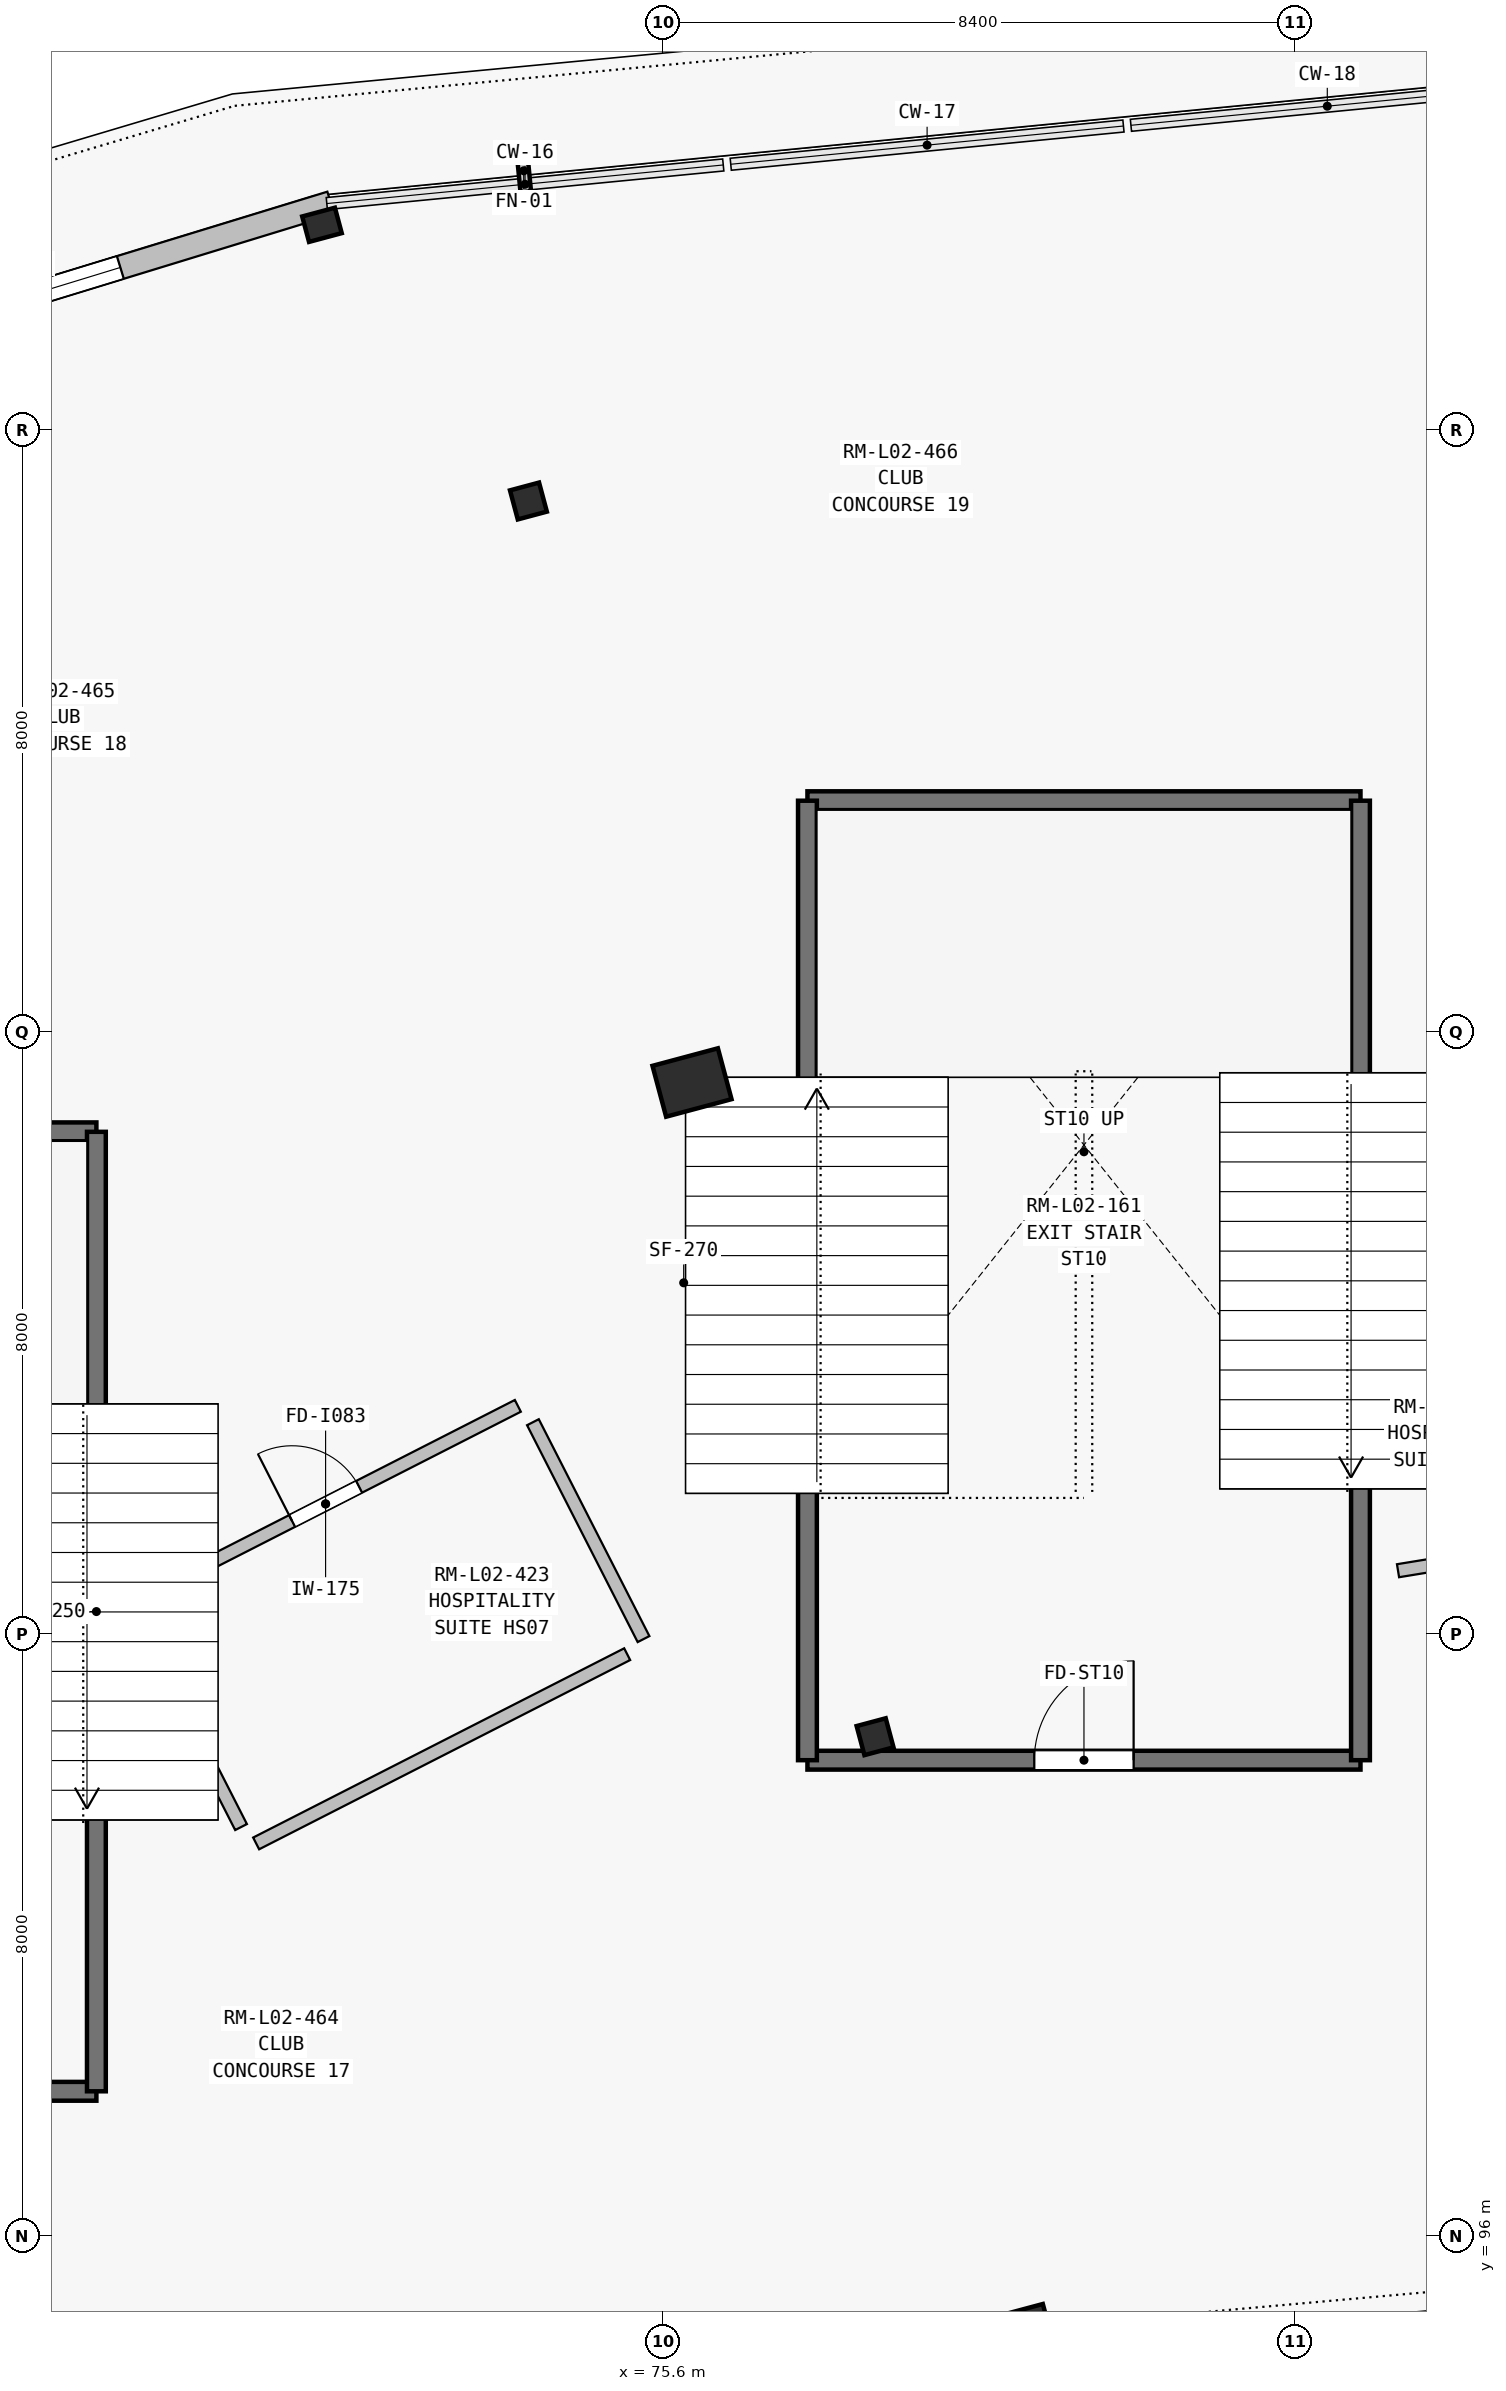
"""IFC4 building model, lengths in metres.
Left out: names, types, materials, properties, quantities, classifications, styles, units other than length and angle.
Written with IfcOpenShell. Run it as: python <this file> out.ifc"""

import sys

from ifc_helpers import new_model, si_unit, direction, frame, frame_2d, origin, origin_2d, place, context, subcontext, project, spatial, rectangle, i_section, extrude, element, fill, save


model = new_model("IFC4")
c1 = context("Model", 3, precision=1e-05, world=origin(), true_north=direction((0.0, 1.0)))
c2 = subcontext(c1, "Body", "Model", "MODEL_VIEW")
j1 = project(units=[si_unit("LENGTHUNIT", "METRE"), si_unit("PLANEANGLEUNIT", "RADIAN")], contexts=[c1])
p1 = place(None, origin())
s1 = spatial("IfcSite", under=j1, at=p1, CompositionType="ELEMENT")
p2 = place(p1, origin())
s2 = spatial("IfcBuilding", under=s1, at=p2, CompositionType="ELEMENT")
p3 = place(p2, frame((0.0, 0.0, 9.9)))
s3 = spatial("IfcBuildingStorey", under=s2, at=p3, CompositionType="ELEMENT", Elevation=9.9)
p4 = place(p3, frame((78.424, 102.637, 0.0), z_axis=(0.0, 0.0, 1.0), x_axis=(-0.258819045103, 0.965925826289, 0.0)))
e1 = element("IfcColumn", 1, at=p4, inside=s3, PredefinedType="COLUMN", context=c2, shape_type="SweptSolid", body=[
    extrude(i_section(OverallWidth=0.4, OverallDepth=0.4, WebThickness=0.018, FlangeThickness=0.032, at=origin_2d()), origin(), (0.0, 0.0, 1.0), 4.5),
])
p5 = place(p3, frame((80.388, 94.639, 0.0), z_axis=(0.0, 0.0, 1.0), x_axis=(-0.258819045103, 0.965925826289, 0.0)))
e2 = element("IfcColumn", 2, at=p5, inside=s3, PredefinedType="COLUMN", context=c2, shape_type="SweptSolid", body=[
    extrude(rectangle(XDim=0.75, YDim=0.75, at=origin_2d()), origin(), (0.0, 0.0, 1.0), 3.553),
])
p6 = place(p3, frame((75.991, 111.33, 0.0), z_axis=(0.0, 0.0, 1.0), x_axis=(-0.258819045103, 0.965925826289, 0.0)))
e3 = element("IfcColumn", 3, at=p6, inside=s3, PredefinedType="COLUMN", context=c2, shape_type="SweptSolid", body=[
    extrude(rectangle(XDim=0.7, YDim=0.9, at=origin_2d()), origin(), (0.0, 0.0, 1.0), 4.5),
])
p7 = place(p3, frame((73.817, 119.058, 0.0), z_axis=(0.0, 0.0, 1.0), x_axis=(-0.258819045103, 0.965925826289, 0.0)))
e4 = element("IfcColumn", 4, at=p7, inside=s3, PredefinedType="COLUMN", context=c2, shape_type="SweptSolid", body=[
    extrude(i_section(OverallWidth=0.4, OverallDepth=0.4, WebThickness=0.016, FlangeThickness=0.028, at=origin_2d()), origin(), (0.0, 0.0, 1.0), 4.5),
])
p8 = place(p3, frame((71.073, 122.728, 0.0), z_axis=(0.0, 0.0, 1.0), x_axis=(-0.258819045103, 0.965925826289, 0.0)))
e5 = element("IfcColumn", 5, at=p8, inside=s3, PredefinedType="PILASTER", context=c2, shape_type="SweptSolid", body=[
    extrude(rectangle(XDim=0.35, YDim=0.45, at=origin_2d()), origin(), (0.0, 0.0, 1.0), 5.45),
])
p9 = place(p3, frame((50.871, 116.797, 0.0), z_axis=(0.0, 0.0, 1.0), x_axis=(0.956190176803, 0.292746213956, 0.0)))
e6 = element("IfcWall", 6, at=p9, inside=s3, PredefinedType="SOLIDWALL", context=c2, shape_type="SweptSolid", body=[
    extrude(rectangle(XDim=21.25, YDim=0.315, at=frame_2d((10.625, 0.0))), origin(), (0.0, 0.0, 1.0), 4.265),
])
p10 = place(p9, frame((11.025, 0.0, 0.9)))
e7 = element("IfcOpeningElement", 7, at=p10, cuts=e6, PredefinedType="OPENING", context=c2, shape_type="SweptSolid", body=[
    extrude(rectangle(XDim=2.85, YDim=1.6, at=frame_2d((1.425, 0.8))), frame((0.0, 0.167, 0.0), z_axis=(0.0, -1.0, 0.0), x_axis=(1.0, 0.0, 0.0)), (0.0, 0.0, 1.0), 0.335),
])
p11 = place(p9, frame((15.775, 0.0, 0.9)))
e8 = element("IfcOpeningElement", 8, at=p11, cuts=e6, PredefinedType="OPENING", context=c2, shape_type="SweptSolid", body=[
    extrude(rectangle(XDim=2.55, YDim=1.55, at=frame_2d((1.275, 0.775))), frame((0.0, 0.167, 0.0), z_axis=(0.0, -1.0, 0.0), x_axis=(1.0, 0.0, 0.0)), (0.0, 0.0, 1.0), 0.335),
])
p12 = place(p3, frame((60.725, 97.925, 0.0), z_axis=(0.0, 0.0, 1.0), x_axis=(1.0, 0.0, 0.0)))
e9 = element("IfcWall", 9, at=p12, inside=s3, PredefinedType="SHEAR", context=c2, shape_type="SweptSolid", body=[
    extrude(rectangle(XDim=7.35, YDim=0.25, at=frame_2d((3.675, 0.0))), origin(), (0.0, 0.0, 1.0), 4.5),
])
p13 = place(p12, frame((2.975, 0.0, 0.0)))
e10 = element("IfcOpeningElement", 10, at=p13, cuts=e9, PredefinedType="OPENING", context=c2, shape_type="SweptSolid", body=[
    extrude(rectangle(XDim=1.4, YDim=2.2, at=frame_2d((0.7, 1.1))), frame((0.0, 0.135, 0.0), z_axis=(0.0, -1.0, 0.0), x_axis=(1.0, 0.0, 0.0)), (0.0, 0.0, 1.0), 0.27),
])
p14 = place(p3, frame((60.725, 110.675, 0.0), z_axis=(0.0, 0.0, 1.0), x_axis=(1.0, 0.0, 0.0)))
e11 = element("IfcWall", 11, at=p14, inside=s3, PredefinedType="SHEAR", context=c2, shape_type="SweptSolid", body=[
    extrude(rectangle(XDim=7.35, YDim=0.25, at=frame_2d((3.675, 0.0))), origin(), (0.0, 0.0, 1.0), 4.5),
])
p15 = place(p3, frame((68.075, 97.925, 0.0), z_axis=(0.0, 0.0, 1.0), x_axis=(0.0, 1.0, 0.0)))
e12 = element("IfcWall", 12, at=p15, inside=s3, PredefinedType="SHEAR", context=c2, shape_type="SweptSolid", body=[
    extrude(rectangle(XDim=12.75, YDim=0.25, at=frame_2d((6.375, 0.0))), origin(), (0.0, 0.0, 1.0), 4.5),
])
p16 = place(p3, frame((77.525, 102.325, 0.0), z_axis=(0.0, 0.0, 1.0), x_axis=(1.0, 0.0, 0.0)))
e13 = element("IfcWall", 13, at=p16, inside=s3, PredefinedType="SHEAR", context=c2, shape_type="SweptSolid", body=[
    extrude(rectangle(XDim=7.35, YDim=0.25, at=frame_2d((3.675, 0.0))), origin(), (0.0, 0.0, 1.0), 4.5),
])
p17 = place(p16, frame((3.015, 0.0, 0.0)))
e14 = element("IfcOpeningElement", 14, at=p17, cuts=e13, PredefinedType="OPENING", context=c2, shape_type="SweptSolid", body=[
    extrude(rectangle(XDim=1.32, YDim=2.2, at=frame_2d((0.66, 1.1))), frame((0.0, 0.135, 0.0), z_axis=(0.0, -1.0, 0.0), x_axis=(1.0, 0.0, 0.0)), (0.0, 0.0, 1.0), 0.27),
])
p18 = place(p3, frame((77.525, 115.075, 0.0), z_axis=(0.0, 0.0, 1.0), x_axis=(1.0, 0.0, 0.0)))
e15 = element("IfcWall", 15, at=p18, inside=s3, PredefinedType="SHEAR", context=c2, shape_type="SweptSolid", body=[
    extrude(rectangle(XDim=7.35, YDim=0.25, at=frame_2d((3.675, 0.0))), origin(), (0.0, 0.0, 1.0), 4.5),
])
for number, where, z_axis, x_axis in (
    (16, (77.525, 102.325, 0.0), (0.0, 0.0, 1.0), (0.0, 1.0, 0.0)),
    (17, (84.875, 102.325, 0.0), (0.0, 0.0, 1.0), (0.0, 1.0, 0.0)),
):
    element("IfcWall", number, at=place(p3, frame(where, z_axis=z_axis, x_axis=x_axis)), inside=s3, PredefinedType="SHEAR", context=c2, shape_type="SweptSolid", body=[
        extrude(rectangle(XDim=12.75, YDim=0.25, at=frame_2d((6.375, 0.0))), origin(), (0.0, 0.0, 1.0), 4.5),
    ])
p19 = place(p3, frame((88.353, 105.329, 0.0), z_axis=(0.0, 0.0, 1.0), x_axis=(-0.98693078035, -0.16114476348, 0.0)))
e18 = element("IfcWall", 18, at=p19, inside=s3, PredefinedType="PARTITIONING", context=c2, shape_type="SweptSolid", body=[
    extrude(rectangle(XDim=3.018, YDim=0.175, at=frame_2d((1.509, 0.0))), origin(), (0.0, 0.0, 1.0), 4.19),
])
p20 = place(p3, frame((85.374, 108.49, 0.0), z_axis=(0.0, 0.0, 1.0), x_axis=(0.986934184777, 0.161123911693, 0.0)))
e19 = element("IfcWall", 19, at=p20, inside=s3, PredefinedType="PARTITIONING", context=c2, shape_type="SweptSolid", body=[
    extrude(rectangle(XDim=2.43, YDim=0.175, at=frame_2d((1.215, 0.0))), origin(), (0.0, 0.0, 1.0), 4.19),
])
p21 = place(p3, frame((68.566, 104.428, 0.0), z_axis=(0.0, 0.0, 1.0), x_axis=(0.890831838742, 0.454333176297, 0.0)))
e20 = element("IfcWall", 20, at=p21, inside=s3, PredefinedType="PARTITIONING", context=c2, shape_type="SweptSolid", body=[
    extrude(rectangle(XDim=5.736, YDim=0.175, at=frame_2d((2.868, 0.0))), origin(), (0.0, 0.0, 1.0), 4.19),
])
p22 = place(p21, frame((2.368, 0.0, 0.0)))
e21 = element("IfcOpeningElement", 21, at=p22, cuts=e20, PredefinedType="OPENING", context=c2, shape_type="SweptSolid", body=[
    extrude(rectangle(XDim=1.0, YDim=2.2, at=frame_2d((0.5, 1.1))), frame((0.0, 0.097, 0.0), z_axis=(0.0, -1.0, 0.0), x_axis=(1.0, 0.0, 0.0)), (0.0, 0.0, 1.0), 0.195),
])
p23 = place(p3, frame((73.877, 106.816, 0.0), z_axis=(0.0, 0.0, 1.0), x_axis=(0.454353030946, -0.890821712393, 0.0)))
e22 = element("IfcWall", 22, at=p23, inside=s3, PredefinedType="PARTITIONING", context=c2, shape_type="SweptSolid", body=[
    extrude(rectangle(XDim=3.235, YDim=0.175, at=frame_2d((1.618, 0.0))), origin(), (0.0, 0.0, 1.0), 4.19),
])
p24 = place(p3, frame((75.129, 103.734, 0.0), z_axis=(0.0, 0.0, 1.0), x_axis=(-0.890825995052, -0.454344634105, 0.0)))
e23 = element("IfcWall", 23, at=p24, inside=s3, PredefinedType="PARTITIONING", context=c2, shape_type="SweptSolid", body=[
    extrude(rectangle(XDim=5.535, YDim=0.175, at=frame_2d((2.768, 0.0))), origin(), (0.0, 0.0, 1.0), 4.19),
])
p25 = place(p3, frame((69.998, 101.436, 0.0), z_axis=(0.0, 0.0, 1.0), x_axis=(-0.454317775379, 0.890839693197, 0.0)))
e24 = element("IfcWall", 24, at=p25, inside=s3, PredefinedType="PARTITIONING", context=c2, shape_type="SweptSolid", body=[
    extrude(rectangle(XDim=3.032, YDim=0.175, at=frame_2d((1.516, 0.0))), origin(), (0.0, 0.0, 1.0), 4.19),
])
p26 = place(p11, origin())
e25 = element("IfcWindow", 25, at=p26, inside=s3, PartitioningType="SINGLE_PANEL", PredefinedType="WINDOW", context=c2, shape_type="SweptSolid", body=[
    extrude(rectangle(XDim=2.55, YDim=1.55, at=frame_2d((1.275, 0.775))), frame((0.0, 0.03, 0.0), z_axis=(0.0, -1.0, 0.0), x_axis=(1.0, 0.0, 0.0)), (0.0, 0.0, 1.0), 0.06),
])
fill(e8, e25)
p27 = place(p17, origin())
e26 = element("IfcDoor", 26, at=p27, inside=s3, OperationType="SINGLE_SWING_RIGHT", PredefinedType="DOOR", context=c2, shape_type="SweptSolid", body=[
    extrude(rectangle(XDim=1.32, YDim=2.2, at=frame_2d((0.66, 1.1))), frame((0.0, 0.025, 0.0), z_axis=(0.0, -1.0, 0.0), x_axis=(1.0, 0.0, 0.0)), (0.0, 0.0, 1.0), 0.05),
])
fill(e14, e26)
p28 = place(p22, origin())
e27 = element("IfcDoor", 27, at=p28, inside=s3, OperationType="SINGLE_SWING_LEFT", PredefinedType="DOOR", context=c2, shape_type="SweptSolid", body=[
    extrude(rectangle(XDim=1.0, YDim=2.2, at=frame_2d((0.5, 1.1))), frame((0.0, 0.025, 0.0), z_axis=(0.0, -1.0, 0.0), x_axis=(1.0, 0.0, 0.0)), (0.0, 0.0, 1.0), 0.05),
])
fill(e21, e27)
save(model, sys.argv[1])
